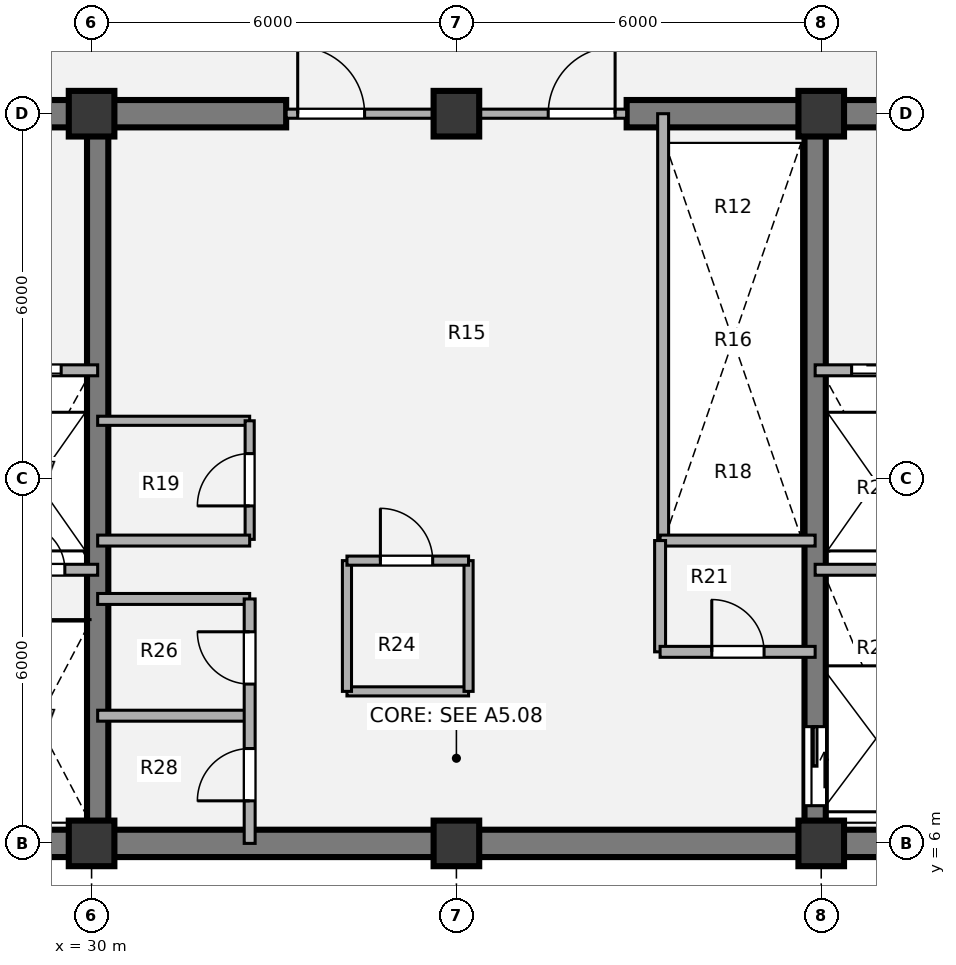
"""IFC4 building model, lengths in metres.
Left out: names, types, materials, properties, quantities, classifications, styles, units other than length and angle.
Written with IfcOpenShell. Run it as: python <this file> out.ifc"""

import sys

from ifc_helpers import new_model, si_unit, direction, frame, frame_2d, origin, origin_2d, place, context, subcontext, project, spatial, rectangle, extrude, source, transform, mapped, element, fill, save


model = new_model("IFC4")
c1 = context("Model", 3, precision=1e-05, world=origin(), true_north=direction((0.0, 1.0)))
c2 = subcontext(c1, "Body", "Model", "MODEL_VIEW")
j1 = project(units=[si_unit("LENGTHUNIT", "METRE"), si_unit("PLANEANGLEUNIT", "RADIAN")], contexts=[c1])
p1 = place(None, origin())
s1 = spatial("IfcSite", under=j1, at=p1, CompositionType="ELEMENT")
p2 = place(p1, origin())
s2 = spatial("IfcBuilding", under=s1, at=p2, CompositionType="ELEMENT")
p3 = place(p2, frame((0.0, 0.0, 190.44)))
s3 = spatial("IfcBuildingStorey", under=s2, at=p3, CompositionType="ELEMENT", Elevation=190.44)
m1 = source(origin(), c2, "Body", "SweptSolid", [
    extrude(rectangle(XDim=0.75, YDim=0.75, at=origin_2d()), origin(), (0.0, 0.0, 1.0), 3.78),
])
for number, where, z_axis, x_axis in (
    (1, (30.0, 6.0, 0.0), (0.0, 0.0, 1.0), (1.0, 0.0, 0.0)),
    (2, (36.0, 6.0, 0.0), (0.0, 0.0, 1.0), (1.0, 0.0, 0.0)),
    (3, (42.0, 6.0, 0.0), (0.0, 0.0, 1.0), (1.0, 0.0, 0.0)),
    (4, (30.0, 18.0, 0.0), (0.0, 0.0, 1.0), (1.0, 0.0, 0.0)),
    (5, (36.0, 18.0, 0.0), (0.0, 0.0, 1.0), (1.0, 0.0, 0.0)),
    (6, (42.0, 18.0, 0.0), (0.0, 0.0, 1.0), (1.0, 0.0, 0.0)),
):
    element("IfcColumn", number, at=place(p3, frame(where, z_axis=z_axis, x_axis=x_axis)), inside=s3, PredefinedType="COLUMN", context=c2, shape_type="MappedRepresentation", body=[
        mapped(m1, transform((0.0, 0.0, 0.0), x_axis=(1.0, 0.0, 0.0), y_axis=(0.0, 1.0, 0.0), z_axis=(0.0, 0.0, 1.0), scale=1.0)),
    ])
p4 = place(p3, frame((48.225, 6.0, 0.0), z_axis=(0.0, 0.0, 1.0), x_axis=(-1.0, 0.0, 0.0)))
e7 = element("IfcWall", 7, at=p4, inside=s3, PredefinedType="SHEAR", context=c2, shape_type="SweptSolid", body=[
    extrude(rectangle(XDim=24.45, YDim=0.45, at=frame_2d((12.225, 0.0))), origin(), (0.0, 0.0, 1.0), 3.78),
])
p5 = place(p3, frame((23.775, 18.0, 0.0), z_axis=(0.0, 0.0, 1.0), x_axis=(1.0, 0.0, 0.0)))
e8 = element("IfcWall", 8, at=p5, inside=s3, PredefinedType="SHEAR", context=c2, shape_type="SweptSolid", body=[
    extrude(rectangle(XDim=9.425, YDim=0.45, at=frame_2d((4.712, 0.0))), origin(), (0.0, 0.0, 1.0), 3.78),
])
p6 = place(p5, frame((2.95, 0.0, 0.0)))
e9 = element("IfcOpeningElement", 9, at=p6, cuts=e8, PredefinedType="OPENING", context=c2, shape_type="SweptSolid", body=[
    extrude(rectangle(XDim=1.1, YDim=2.1, at=origin_2d()), frame((0.55, 0.235, 1.05), z_axis=(0.0, -1.0, 0.0), x_axis=(1.0, 0.0, 0.0)), (0.0, 0.0, 1.0), 0.47),
])
p7 = place(p3, frame((38.8, 18.0, 0.0), z_axis=(0.0, 0.0, 1.0), x_axis=(1.0, 0.0, 0.0)))
e10 = element("IfcWall", 10, at=p7, inside=s3, PredefinedType="SHEAR", context=c2, shape_type="SweptSolid", body=[
    extrude(rectangle(XDim=9.425, YDim=0.45, at=frame_2d((4.712, 0.0))), origin(), (0.0, 0.0, 1.0), 3.78),
])
p8 = place(p7, frame((5.45, 0.0, 0.0)))
e11 = element("IfcOpeningElement", 11, at=p8, cuts=e10, PredefinedType="OPENING", context=c2, shape_type="SweptSolid", body=[
    extrude(rectangle(XDim=1.1, YDim=2.1, at=origin_2d()), frame((0.55, 0.235, 1.05), z_axis=(0.0, -1.0, 0.0), x_axis=(1.0, 0.0, 0.0)), (0.0, 0.0, 1.0), 0.47),
])
p9 = place(p3, frame((30.1, 6.0, 0.0), z_axis=(0.0, 0.0, 1.0), x_axis=(0.0, 1.0, 0.0)))
e12 = element("IfcWall", 12, at=p9, inside=s3, PredefinedType="SHEAR", context=c2, shape_type="SweptSolid", body=[
    extrude(rectangle(XDim=12.0, YDim=0.35, at=frame_2d((6.0, 0.0))), origin(), (0.0, 0.0, 1.0), 3.78),
])
p10 = place(p3, frame((41.9, 18.0, 0.0), z_axis=(0.0, 0.0, 1.0), x_axis=(0.0, -1.0, 0.0)))
e13 = element("IfcWall", 13, at=p10, inside=s3, PredefinedType="SHEAR", context=c2, shape_type="SweptSolid", body=[
    extrude(rectangle(XDim=12.0, YDim=0.35, at=frame_2d((6.0, 0.0))), origin(), (0.0, 0.0, 1.0), 3.78),
])
p11 = place(p10, frame((10.08, 0.0, 0.0)))
e14 = element("IfcOpeningElement", 14, at=p11, cuts=e13, PredefinedType="OPENING", context=c2, shape_type="SweptSolid", body=[
    extrude(rectangle(XDim=1.3, YDim=2.1, at=origin_2d()), frame((0.65, 0.185, 1.05), z_axis=(0.0, -1.0, 0.0), x_axis=(1.0, 0.0, 0.0)), (0.0, 0.0, 1.0), 0.37),
])
p12 = place(p3, frame((30.1, 12.95, 0.0), z_axis=(0.0, 0.0, 1.0), x_axis=(1.0, 0.0, 0.0)))
e15 = element("IfcWall", 15, at=p12, inside=s3, PredefinedType="PARTITIONING", context=c2, shape_type="SweptSolid", body=[
    extrude(rectangle(XDim=2.5, YDim=0.15, at=frame_2d((1.25, 0.0))), origin(), (0.0, 0.0, 1.0), 3.5),
])
p13 = place(p3, frame((32.6, 11.0, 0.0), z_axis=(0.0, 0.0, 1.0), x_axis=(0.0, 1.0, 0.0)))
e16 = element("IfcWall", 16, at=p13, inside=s3, PredefinedType="PARTITIONING", context=c2, shape_type="SweptSolid", body=[
    extrude(rectangle(XDim=1.95, YDim=0.15, at=frame_2d((0.975, 0.0))), origin(), (0.0, 0.0, 1.0), 3.5),
])
p14 = place(p13, frame((0.55, 0.0, 0.0)))
e17 = element("IfcOpeningElement", 17, at=p14, cuts=e16, PredefinedType="OPENING", context=c2, shape_type="SweptSolid", body=[
    extrude(rectangle(XDim=0.86, YDim=2.1, at=origin_2d()), frame((0.43, 0.085, 1.05), z_axis=(0.0, -1.0, 0.0), x_axis=(1.0, 0.0, 0.0)), (0.0, 0.0, 1.0), 0.17),
])
p15 = place(p3, frame((34.2, 8.5, 0.0), z_axis=(0.0, 0.0, 1.0), x_axis=(1.0, 0.0, 0.0)))
e18 = element("IfcWall", 18, at=p15, inside=s3, PredefinedType="PARTITIONING", context=c2, shape_type="SweptSolid", body=[
    extrude(rectangle(XDim=2.0, YDim=0.15, at=frame_2d((1.0, 0.0))), origin(), (0.0, 0.0, 1.0), 3.5),
])
p16 = place(p3, frame((34.2, 8.5, 0.0), z_axis=(0.0, 0.0, 1.0), x_axis=(0.0, 1.0, 0.0)))
e19 = element("IfcWall", 19, at=p16, inside=s3, PredefinedType="PARTITIONING", context=c2, shape_type="SweptSolid", body=[
    extrude(rectangle(XDim=2.15, YDim=0.15, at=frame_2d((1.075, 0.0))), origin(), (0.0, 0.0, 1.0), 3.5),
])
p17 = place(p3, frame((36.2, 8.5, 0.0), z_axis=(0.0, 0.0, 1.0), x_axis=(0.0, 1.0, 0.0)))
e20 = element("IfcWall", 20, at=p17, inside=s3, PredefinedType="PARTITIONING", context=c2, shape_type="SweptSolid", body=[
    extrude(rectangle(XDim=2.15, YDim=0.15, at=frame_2d((1.075, 0.0))), origin(), (0.0, 0.0, 1.0), 2.715),
])
p18 = place(p3, frame((34.2, 10.65, 0.0), z_axis=(0.0, 0.0, 1.0), x_axis=(1.0, 0.0, 0.0)))
e21 = element("IfcWall", 21, at=p18, inside=s3, PredefinedType="PARTITIONING", context=c2, shape_type="SweptSolid", body=[
    extrude(rectangle(XDim=2.0, YDim=0.15, at=frame_2d((1.0, 0.0))), origin(), (0.0, 0.0, 1.0), 3.5),
])
p19 = place(p18, frame((0.55, 0.0, 0.0)))
e22 = element("IfcOpeningElement", 22, at=p19, cuts=e21, PredefinedType="OPENING", context=c2, shape_type="SweptSolid", body=[
    extrude(rectangle(XDim=0.86, YDim=2.1, at=origin_2d()), frame((0.43, 0.085, 1.05), z_axis=(0.0, -1.0, 0.0), x_axis=(1.0, 0.0, 0.0)), (0.0, 0.0, 1.0), 0.17),
])
p20 = place(p3, frame((39.4, 11.0, 0.0), z_axis=(0.0, 0.0, 1.0), x_axis=(0.0, 1.0, 0.0)))
e23 = element("IfcWall", 23, at=p20, inside=s3, PredefinedType="PARTITIONING", context=c2, shape_type="SweptSolid", body=[
    extrude(rectangle(XDim=7.0, YDim=0.18, at=frame_2d((3.5, 0.0))), origin(), (0.0, 0.0, 1.0), 3.5),
])
p21 = place(p3, frame((30.1, 10.98, 0.0), z_axis=(0.0, 0.0, 1.0), x_axis=(1.0, 0.0, 0.0)))
e24 = element("IfcWall", 24, at=p21, inside=s3, PredefinedType="PARTITIONING", context=c2, shape_type="SweptSolid", body=[
    extrude(rectangle(XDim=2.5, YDim=0.18, at=frame_2d((1.25, 0.0))), origin(), (0.0, 0.0, 1.0), 3.5),
])
p22 = place(p3, frame((39.35, 10.98, 0.0), z_axis=(0.0, 0.0, 1.0), x_axis=(1.0, 0.0, 0.0)))
e25 = element("IfcWall", 25, at=p22, inside=s3, PredefinedType="PARTITIONING", context=c2, shape_type="SweptSolid", body=[
    extrude(rectangle(XDim=2.55, YDim=0.18, at=frame_2d((1.275, 0.0))), origin(), (0.0, 0.0, 1.0), 3.5),
])
for number, where, z_axis, x_axis in (
    (26, (30.1, 8.1, 0.0), (0.0, 0.0, 1.0), (1.0, 0.0, 0.0)),
    (27, (30.1, 10.02, 0.0), (0.0, 0.0, 1.0), (1.0, 0.0, 0.0)),
):
    element("IfcWall", number, at=place(p3, frame(where, z_axis=z_axis, x_axis=x_axis)), inside=s3, PredefinedType="PARTITIONING", context=c2, shape_type="SweptSolid", body=[
        extrude(rectangle(XDim=2.5, YDim=0.18, at=frame_2d((1.25, 0.0))), origin(), (0.0, 0.0, 1.0), 3.5),
    ])
p23 = place(p3, frame((32.6, 6.0, 0.0), z_axis=(0.0, 0.0, 1.0), x_axis=(0.0, 1.0, 0.0)))
e28 = element("IfcWall", 28, at=p23, inside=s3, PredefinedType="PARTITIONING", context=c2, shape_type="SweptSolid", body=[
    extrude(rectangle(XDim=4.02, YDim=0.18, at=frame_2d((2.01, 0.0))), origin(), (0.0, 0.0, 1.0), 3.5),
])
p24 = place(p23, frame((0.7, 0.0, 0.0)))
e29 = element("IfcOpeningElement", 29, at=p24, cuts=e28, PredefinedType="OPENING", context=c2, shape_type="SweptSolid", body=[
    extrude(rectangle(XDim=0.86, YDim=2.1, at=origin_2d()), frame((0.43, 0.1, 1.05), z_axis=(0.0, -1.0, 0.0), x_axis=(1.0, 0.0, 0.0)), (0.0, 0.0, 1.0), 0.2),
])
p25 = place(p23, frame((2.62, 0.0, 0.0)))
e30 = element("IfcOpeningElement", 30, at=p25, cuts=e28, PredefinedType="OPENING", context=c2, shape_type="SweptSolid", body=[
    extrude(rectangle(XDim=0.86, YDim=2.1, at=origin_2d()), frame((0.43, 0.1, 1.05), z_axis=(0.0, -1.0, 0.0), x_axis=(1.0, 0.0, 0.0)), (0.0, 0.0, 1.0), 0.2),
])
p26 = place(p3, frame((39.35, 9.15, 0.0), z_axis=(0.0, 0.0, 1.0), x_axis=(0.0, 1.0, 0.0)))
e31 = element("IfcWall", 31, at=p26, inside=s3, PredefinedType="PARTITIONING", context=c2, shape_type="SweptSolid", body=[
    extrude(rectangle(XDim=1.83, YDim=0.18, at=frame_2d((0.915, 0.0))), origin(), (0.0, 0.0, 1.0), 3.5),
])
p27 = place(p3, frame((39.35, 9.15, 0.0), z_axis=(0.0, 0.0, 1.0), x_axis=(1.0, 0.0, 0.0)))
e32 = element("IfcWall", 32, at=p27, inside=s3, PredefinedType="PARTITIONING", context=c2, shape_type="SweptSolid", body=[
    extrude(rectangle(XDim=2.55, YDim=0.18, at=frame_2d((1.275, 0.0))), origin(), (0.0, 0.0, 1.0), 3.5),
])
p28 = place(p27, frame((0.85, 0.0, 0.0)))
e33 = element("IfcOpeningElement", 33, at=p28, cuts=e32, PredefinedType="OPENING", context=c2, shape_type="SweptSolid", body=[
    extrude(rectangle(XDim=0.86, YDim=2.1, at=origin_2d()), frame((0.43, 0.1, 1.05), z_axis=(0.0, -1.0, 0.0), x_axis=(1.0, 0.0, 0.0)), (0.0, 0.0, 1.0), 0.2),
])
p29 = place(p3, frame((33.2, 18.0, 0.0), z_axis=(0.0, 0.0, 1.0), x_axis=(1.0, 0.0, 0.0)))
e34 = element("IfcWall", 34, at=p29, inside=s3, PredefinedType="PARTITIONING", context=c2, shape_type="SweptSolid", body=[
    extrude(rectangle(XDim=5.6, YDim=0.15, at=frame_2d((2.8, 0.0))), origin(), (0.0, 0.0, 1.0), 2.515),
])
p30 = place(p29, frame((0.19, 0.0, 0.0)))
e35 = element("IfcOpeningElement", 35, at=p30, cuts=e34, PredefinedType="OPENING", context=c2, shape_type="SweptSolid", body=[
    extrude(rectangle(XDim=1.1, YDim=2.1, at=origin_2d()), frame((0.55, 0.085, 1.05), z_axis=(0.0, -1.0, 0.0), x_axis=(1.0, 0.0, 0.0)), (0.0, 0.0, 1.0), 0.17),
])
p31 = place(p29, frame((4.31, 0.0, 0.0)))
e36 = element("IfcOpeningElement", 36, at=p31, cuts=e34, PredefinedType="OPENING", context=c2, shape_type="SweptSolid", body=[
    extrude(rectangle(XDim=1.1, YDim=2.1, at=origin_2d()), frame((0.55, 0.085, 1.05), z_axis=(0.0, -1.0, 0.0), x_axis=(1.0, 0.0, 0.0)), (0.0, 0.0, 1.0), 0.17),
])
p32 = place(p3, frame((24.0, 13.78, 0.0), z_axis=(0.0, 0.0, 1.0), x_axis=(1.0, 0.0, 0.0)))
e37 = element("IfcWall", 37, at=p32, inside=s3, PredefinedType="PARTITIONING", context=c2, shape_type="SweptSolid", body=[
    extrude(rectangle(XDim=6.1, YDim=0.18, at=frame_2d((3.05, 0.0))), origin(), (0.0, 0.0, 1.0), 3.5),
])
p33 = place(p32, frame((1.15, 0.0, 0.0)))
e38 = element("IfcOpeningElement", 38, at=p33, cuts=e37, PredefinedType="OPENING", context=c2, shape_type="SweptSolid", body=[
    extrude(rectangle(XDim=1.1, YDim=2.1, at=origin_2d()), frame((0.55, 0.1, 1.05), z_axis=(0.0, -1.0, 0.0), x_axis=(1.0, 0.0, 0.0)), (0.0, 0.0, 1.0), 0.2),
])
p34 = place(p32, frame((4.4, 0.0, 0.0)))
e39 = element("IfcOpeningElement", 39, at=p34, cuts=e37, PredefinedType="OPENING", context=c2, shape_type="SweptSolid", body=[
    extrude(rectangle(XDim=1.1, YDim=2.1, at=origin_2d()), frame((0.55, 0.1, 1.05), z_axis=(0.0, -1.0, 0.0), x_axis=(1.0, 0.0, 0.0)), (0.0, 0.0, 1.0), 0.2),
])
p35 = place(p3, frame((28.15, 10.5, 0.0), z_axis=(0.0, 0.0, 1.0), x_axis=(1.0, 0.0, 0.0)))
e40 = element("IfcWall", 40, at=p35, inside=s3, PredefinedType="PARTITIONING", context=c2, shape_type="SweptSolid", body=[
    extrude(rectangle(XDim=1.95, YDim=0.18, at=frame_2d((0.975, 0.0))), origin(), (0.0, 0.0, 1.0), 3.5),
])
p36 = place(p35, frame((0.65, 0.0, 0.0)))
e41 = element("IfcOpeningElement", 41, at=p36, cuts=e40, PredefinedType="OPENING", context=c2, shape_type="SweptSolid", body=[
    extrude(rectangle(XDim=0.76, YDim=2.05, at=origin_2d()), frame((0.38, 0.1, 1.025), z_axis=(0.0, -1.0, 0.0), x_axis=(1.0, 0.0, 0.0)), (0.0, 0.0, 1.0), 0.2),
])
p37 = place(p3, frame((41.9, 13.78, 0.0), z_axis=(0.0, 0.0, 1.0), x_axis=(1.0, 0.0, 0.0)))
e42 = element("IfcWall", 42, at=p37, inside=s3, PredefinedType="PARTITIONING", context=c2, shape_type="SweptSolid", body=[
    extrude(rectangle(XDim=6.1, YDim=0.18, at=frame_2d((3.05, 0.0))), origin(), (0.0, 0.0, 1.0), 3.5),
])
p38 = place(p37, frame((0.6, 0.0, 0.0)))
e43 = element("IfcOpeningElement", 43, at=p38, cuts=e42, PredefinedType="OPENING", context=c2, shape_type="SweptSolid", body=[
    extrude(rectangle(XDim=1.1, YDim=2.1, at=origin_2d()), frame((0.55, 0.1, 1.05), z_axis=(0.0, -1.0, 0.0), x_axis=(1.0, 0.0, 0.0)), (0.0, 0.0, 1.0), 0.2),
])
p39 = place(p37, frame((3.8, 0.0, 0.0)))
e44 = element("IfcOpeningElement", 44, at=p39, cuts=e42, PredefinedType="OPENING", context=c2, shape_type="SweptSolid", body=[
    extrude(rectangle(XDim=1.1, YDim=2.1, at=origin_2d()), frame((0.55, 0.1, 1.05), z_axis=(0.0, -1.0, 0.0), x_axis=(1.0, 0.0, 0.0)), (0.0, 0.0, 1.0), 0.2),
])
p40 = place(p3, frame((41.9, 10.5, 0.0), z_axis=(0.0, 0.0, 1.0), x_axis=(1.0, 0.0, 0.0)))
e45 = element("IfcWall", 45, at=p40, inside=s3, PredefinedType="PARTITIONING", context=c2, shape_type="SweptSolid", body=[
    extrude(rectangle(XDim=1.95, YDim=0.18, at=frame_2d((0.975, 0.0))), origin(), (0.0, 0.0, 1.0), 3.5),
])
m2 = source(origin(), c2, "Body", "SweptSolid", [
    extrude(rectangle(XDim=0.86, YDim=2.1, at=origin_2d()), frame((0.43, 0.025, 1.05), z_axis=(0.0, -1.0, 0.0), x_axis=(1.0, 0.0, 0.0)), (0.0, 0.0, 1.0), 0.05),
])
p41 = place(p14, origin())
e46 = element("IfcDoor", 46, at=p41, inside=s3, OperationType="SINGLE_SWING_LEFT", PredefinedType="DOOR", context=c2, shape_type="MappedRepresentation", body=[
    mapped(m2, transform((0.0, 0.0, 0.0), x_axis=(1.0, 0.0, 0.0), y_axis=(0.0, 1.0, 0.0), z_axis=(0.0, 0.0, 1.0), scale=1.0)),
])
fill(e17, e46)
p42 = place(p19, origin())
e47 = element("IfcDoor", 47, at=p42, inside=s3, OperationType="SINGLE_SWING_LEFT", PredefinedType="DOOR", context=c2, shape_type="MappedRepresentation", body=[
    mapped(m2, transform((0.0, 0.0, 0.0), x_axis=(1.0, 0.0, 0.0), y_axis=(0.0, 1.0, 0.0), z_axis=(0.0, 0.0, 1.0), scale=1.0)),
])
fill(e22, e47)
p43 = place(p24, origin())
e48 = element("IfcDoor", 48, at=p43, inside=s3, OperationType="SINGLE_SWING_LEFT", PredefinedType="DOOR", context=c2, shape_type="MappedRepresentation", body=[
    mapped(m2, transform((0.0, 0.0, 0.0), x_axis=(1.0, 0.0, 0.0), y_axis=(0.0, 1.0, 0.0), z_axis=(0.0, 0.0, 1.0), scale=1.0)),
])
fill(e29, e48)
p44 = place(p25, origin())
e49 = element("IfcDoor", 49, at=p44, inside=s3, OperationType="SINGLE_SWING_RIGHT", PredefinedType="DOOR", context=c2, shape_type="MappedRepresentation", body=[
    mapped(m2, transform((0.0, 0.0, 0.0), x_axis=(1.0, 0.0, 0.0), y_axis=(0.0, 1.0, 0.0), z_axis=(0.0, 0.0, 1.0), scale=1.0)),
])
fill(e30, e49)
p45 = place(p28, origin())
e50 = element("IfcDoor", 50, at=p45, inside=s3, OperationType="SINGLE_SWING_LEFT", PredefinedType="DOOR", context=c2, shape_type="MappedRepresentation", body=[
    mapped(m2, transform((0.0, 0.0, 0.0), x_axis=(1.0, 0.0, 0.0), y_axis=(0.0, 1.0, 0.0), z_axis=(0.0, 0.0, 1.0), scale=1.0)),
])
fill(e33, e50)
m3 = source(origin(), c2, "Body", "SweptSolid", [
    extrude(rectangle(XDim=1.1, YDim=2.1, at=origin_2d()), frame((0.55, 0.025, 1.05), z_axis=(0.0, -1.0, 0.0), x_axis=(1.0, 0.0, 0.0)), (0.0, 0.0, 1.0), 0.05),
])
p46 = place(p30, origin())
e51 = element("IfcDoor", 51, at=p46, inside=s3, OperationType="SINGLE_SWING_LEFT", PredefinedType="DOOR", context=c2, shape_type="MappedRepresentation", body=[
    mapped(m3, transform((0.0, 0.0, 0.0), x_axis=(1.0, 0.0, 0.0), y_axis=(0.0, 1.0, 0.0), z_axis=(0.0, 0.0, 1.0), scale=1.0)),
])
fill(e35, e51)
p47 = place(p31, origin())
e52 = element("IfcDoor", 52, at=p47, inside=s3, OperationType="SINGLE_SWING_RIGHT", PredefinedType="DOOR", context=c2, shape_type="MappedRepresentation", body=[
    mapped(m3, transform((0.0, 0.0, 0.0), x_axis=(1.0, 0.0, 0.0), y_axis=(0.0, 1.0, 0.0), z_axis=(0.0, 0.0, 1.0), scale=1.0)),
])
fill(e36, e52)
m4 = source(origin(), c2, "Body", "SweptSolid", [
    extrude(rectangle(XDim=1.1, YDim=2.1, at=origin_2d()), frame((0.55, 0.025, 1.05), z_axis=(0.0, -1.0, 0.0), x_axis=(1.0, 0.0, 0.0)), (0.0, 0.0, 1.0), 0.05),
])
p48 = place(p34, origin())
e53 = element("IfcDoor", 53, at=p48, inside=s3, OperationType="SLIDING_TO_LEFT", PredefinedType="DOOR", context=c2, shape_type="MappedRepresentation", body=[
    mapped(m4, transform((0.0, 0.0, 0.0), x_axis=(1.0, 0.0, 0.0), y_axis=(0.0, 1.0, 0.0), z_axis=(0.0, 0.0, 1.0), scale=1.0)),
])
fill(e39, e53)
m5 = source(origin(), c2, "Body", "SweptSolid", [
    extrude(rectangle(XDim=0.76, YDim=2.05, at=origin_2d()), frame((0.38, 0.025, 1.025), z_axis=(0.0, -1.0, 0.0), x_axis=(1.0, 0.0, 0.0)), (0.0, 0.0, 1.0), 0.05),
])
p49 = place(p36, origin())
e54 = element("IfcDoor", 54, at=p49, inside=s3, OperationType="SINGLE_SWING_LEFT", PredefinedType="DOOR", context=c2, shape_type="MappedRepresentation", body=[
    mapped(m5, transform((0.0, 0.0, 0.0), x_axis=(1.0, 0.0, 0.0), y_axis=(0.0, 1.0, 0.0), z_axis=(0.0, 0.0, 1.0), scale=1.0)),
])
fill(e41, e54)
p50 = place(p38, origin())
e55 = element("IfcDoor", 55, at=p50, inside=s3, OperationType="SLIDING_TO_RIGHT", PredefinedType="DOOR", context=c2, shape_type="MappedRepresentation", body=[
    mapped(m4, transform((0.0, 0.0, 0.0), x_axis=(1.0, 0.0, 0.0), y_axis=(0.0, 1.0, 0.0), z_axis=(0.0, 0.0, 1.0), scale=1.0)),
])
fill(e43, e55)
m6 = source(origin(), c2, "Body", "SweptSolid", [
    extrude(rectangle(XDim=1.3, YDim=2.1, at=origin_2d()), frame((0.65, 0.025, 1.05), z_axis=(0.0, -1.0, 0.0), x_axis=(1.0, 0.0, 0.0)), (0.0, 0.0, 1.0), 0.05),
])
p51 = place(p11, origin())
e56 = element("IfcDoor", 56, at=p51, inside=s3, OperationType="SLIDING_TO_LEFT", PredefinedType="DOOR", context=c2, shape_type="MappedRepresentation", body=[
    mapped(m6, transform((0.0, 0.0, 0.0), x_axis=(1.0, 0.0, 0.0), y_axis=(0.0, 1.0, 0.0), z_axis=(0.0, 0.0, 1.0), scale=1.0)),
])
fill(e14, e56)
save(model, sys.argv[1])
